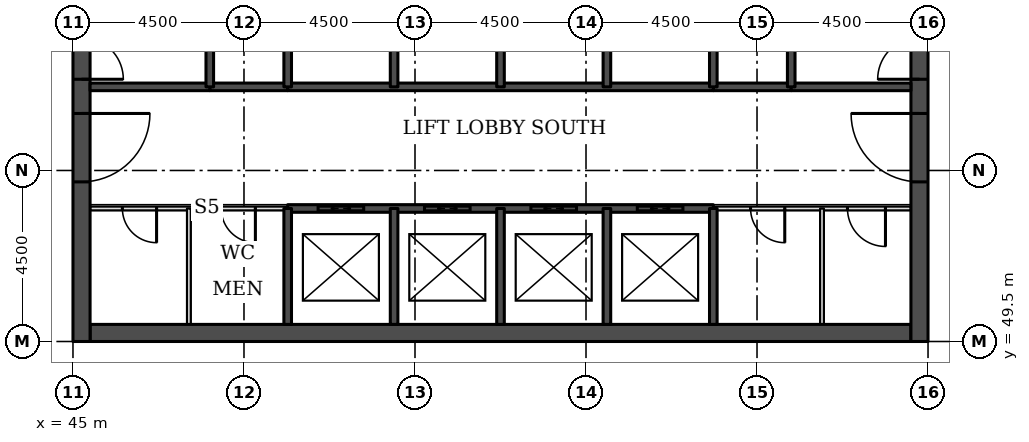
"""IFC4 building model, lengths in metres.
Left out: names, types, materials, properties, quantities, classifications, styles, units other than length and angle.
Written with IfcOpenShell. Run it as: python <this file> out.ifc"""

import sys

from ifc_helpers import new_model, si_unit, direction, frame, frame_2d, origin, place, context, subcontext, project, spatial, rectangle, extrude, element, fill, save


model = new_model("IFC4")
c1 = context("Model", 3, precision=1e-05, world=origin(), true_north=direction((0.0, 1.0)))
c2 = subcontext(c1, "Body", "Model", "MODEL_VIEW")
j1 = project(units=[si_unit("LENGTHUNIT", "METRE"), si_unit("PLANEANGLEUNIT", "RADIAN")], contexts=[c1])
p1 = place(None, origin())
s1 = spatial("IfcSite", under=j1, at=p1, CompositionType="ELEMENT")
p2 = place(p1, origin())
s2 = spatial("IfcBuilding", under=s1, at=p2, CompositionType="ELEMENT")
p3 = place(p2, frame((0.0, 0.0, 130.7)))
s3 = spatial("IfcBuildingStorey", under=s2, at=p3, CompositionType="ELEMENT", Elevation=130.7)
p4 = place(p3, frame((45.45, 49.725, 0.0), z_axis=(0.0, 0.0, 1.0), x_axis=(1.0, 0.0, 0.0)))
e1 = element("IfcWall", 1, at=p4, inside=s3, PredefinedType="SHEAR", context=c2, shape_type="SweptSolid", body=[
    extrude(rectangle(XDim=21.6, YDim=0.45, at=frame_2d((10.8, 0.0))), origin(), (0.0, 0.0, 1.0), 3.7),
])
p5 = place(p3, frame((45.225, 49.5, 0.0), z_axis=(0.0, 0.0, 1.0), x_axis=(0.0, 1.0, 0.0)))
e2 = element("IfcWall", 2, at=p5, inside=s3, PredefinedType="SHEAR", context=c2, shape_type="SweptSolid", body=[
    extrude(rectangle(XDim=22.5, YDim=0.45, at=frame_2d((11.25, 0.0))), origin(), (0.0, 0.0, 1.0), 3.7),
])
p6 = place(p5, frame((4.2, 0.0, 0.0)))
e3 = element("IfcOpeningElement", 3, at=p6, cuts=e2, PredefinedType="OPENING", context=c2, shape_type="SweptSolid", body=[
    extrude(rectangle(XDim=1.8, YDim=2.1, at=frame_2d((0.9, 1.05))), frame((0.0, 0.235, 0.0), z_axis=(0.0, -1.0, 0.0), x_axis=(1.0, 0.0, 0.0)), (0.0, 0.0, 1.0), 0.47),
])
p7 = place(p5, frame((6.9, 0.0, 0.0)))
e4 = element("IfcOpeningElement", 4, at=p7, cuts=e2, PredefinedType="OPENING", context=c2, shape_type="SweptSolid", body=[
    extrude(rectangle(XDim=1.1, YDim=2.1, at=frame_2d((0.55, 1.05))), frame((0.0, 0.235, 0.0), z_axis=(0.0, -1.0, 0.0), x_axis=(1.0, 0.0, 0.0)), (0.0, 0.0, 1.0), 0.47),
])
p8 = place(p5, frame((13.6, 0.0, 0.0)))
e5 = element("IfcOpeningElement", 5, at=p8, cuts=e2, PredefinedType="OPENING", context=c2, shape_type="SweptSolid", body=[
    extrude(rectangle(XDim=1.1, YDim=2.1, at=frame_2d((0.55, 1.05))), frame((0.0, 0.235, 0.0), z_axis=(0.0, -1.0, 0.0), x_axis=(1.0, 0.0, 0.0)), (0.0, 0.0, 1.0), 0.47),
])
p9 = place(p5, frame((16.5, 0.0, 0.0)))
e6 = element("IfcOpeningElement", 6, at=p9, cuts=e2, PredefinedType="OPENING", context=c2, shape_type="SweptSolid", body=[
    extrude(rectangle(XDim=1.8, YDim=2.1, at=frame_2d((0.9, 1.05))), frame((0.0, 0.235, 0.0), z_axis=(0.0, -1.0, 0.0), x_axis=(1.0, 0.0, 0.0)), (0.0, 0.0, 1.0), 0.47),
])
p10 = place(p3, frame((67.275, 49.5, 0.0), z_axis=(0.0, 0.0, 1.0), x_axis=(0.0, 1.0, 0.0)))
e7 = element("IfcWall", 7, at=p10, inside=s3, PredefinedType="SHEAR", context=c2, shape_type="SweptSolid", body=[
    extrude(rectangle(XDim=22.5, YDim=0.45, at=frame_2d((11.25, 0.0))), origin(), (0.0, 0.0, 1.0), 3.7),
])
p11 = place(p10, frame((4.2, 0.0, 0.0)))
e8 = element("IfcOpeningElement", 8, at=p11, cuts=e7, PredefinedType="OPENING", context=c2, shape_type="SweptSolid", body=[
    extrude(rectangle(XDim=1.8, YDim=2.1, at=frame_2d((0.9, 1.05))), frame((0.0, 0.235, 0.0), z_axis=(0.0, -1.0, 0.0), x_axis=(1.0, 0.0, 0.0)), (0.0, 0.0, 1.0), 0.47),
])
p12 = place(p10, frame((6.9, 0.0, 0.0)))
e9 = element("IfcOpeningElement", 9, at=p12, cuts=e7, PredefinedType="OPENING", context=c2, shape_type="SweptSolid", body=[
    extrude(rectangle(XDim=1.1, YDim=2.1, at=frame_2d((0.55, 1.05))), frame((0.0, 0.235, 0.0), z_axis=(0.0, -1.0, 0.0), x_axis=(1.0, 0.0, 0.0)), (0.0, 0.0, 1.0), 0.47),
])
p13 = place(p10, frame((13.6, 0.0, 0.0)))
e10 = element("IfcOpeningElement", 10, at=p13, cuts=e7, PredefinedType="OPENING", context=c2, shape_type="SweptSolid", body=[
    extrude(rectangle(XDim=1.1, YDim=2.1, at=frame_2d((0.55, 1.05))), frame((0.0, 0.235, 0.0), z_axis=(0.0, -1.0, 0.0), x_axis=(1.0, 0.0, 0.0)), (0.0, 0.0, 1.0), 0.47),
])
p14 = place(p10, frame((16.5, 0.0, 0.0)))
e11 = element("IfcOpeningElement", 11, at=p14, cuts=e7, PredefinedType="OPENING", context=c2, shape_type="SweptSolid", body=[
    extrude(rectangle(XDim=1.8, YDim=2.1, at=frame_2d((0.9, 1.05))), frame((0.0, 0.235, 0.0), z_axis=(0.0, -1.0, 0.0), x_axis=(1.0, 0.0, 0.0)), (0.0, 0.0, 1.0), 0.47),
])
p15 = place(p3, frame((45.45, 53.0, 0.0), z_axis=(0.0, 0.0, 1.0), x_axis=(1.0, 0.0, 0.0)))
e12 = element("IfcWall", 12, at=p15, inside=s3, PredefinedType="PARTITIONING", context=c2, shape_type="SweptSolid", body=[
    extrude(rectangle(XDim=5.2, YDim=0.1, at=frame_2d((2.6, 0.0))), origin(), (0.0, 0.0, 1.0), 3.55),
])
p16 = place(p15, frame((0.85, 0.0, 0.0)))
e13 = element("IfcOpeningElement", 13, at=p16, cuts=e12, PredefinedType="OPENING", context=c2, shape_type="SweptSolid", body=[
    extrude(rectangle(XDim=0.9, YDim=2.1, at=frame_2d((0.45, 1.05))), frame((0.0, 0.06, 0.0), z_axis=(0.0, -1.0, 0.0), x_axis=(1.0, 0.0, 0.0)), (0.0, 0.0, 1.0), 0.12),
])
p17 = place(p15, frame((3.45, 0.0, 0.0)))
e14 = element("IfcOpeningElement", 14, at=p17, cuts=e12, PredefinedType="OPENING", context=c2, shape_type="SweptSolid", body=[
    extrude(rectangle(XDim=0.9, YDim=2.1, at=frame_2d((0.45, 1.05))), frame((0.0, 0.06, 0.0), z_axis=(0.0, -1.0, 0.0), x_axis=(1.0, 0.0, 0.0)), (0.0, 0.0, 1.0), 0.12),
])
p18 = place(p3, frame((61.85, 53.0, 0.0), z_axis=(0.0, 0.0, 1.0), x_axis=(1.0, 0.0, 0.0)))
e15 = element("IfcWall", 15, at=p18, inside=s3, PredefinedType="PARTITIONING", context=c2, shape_type="SweptSolid", body=[
    extrude(rectangle(XDim=5.2, YDim=0.1, at=frame_2d((2.6, 0.0))), origin(), (0.0, 0.0, 1.0), 3.55),
])
p19 = place(p18, frame((3.53, 0.0, 0.0)))
e16 = element("IfcOpeningElement", 16, at=p19, cuts=e15, PredefinedType="OPENING", context=c2, shape_type="SweptSolid", body=[
    extrude(rectangle(XDim=1.0, YDim=2.1, at=frame_2d((0.5, 1.05))), frame((0.0, 0.06, 0.0), z_axis=(0.0, -1.0, 0.0), x_axis=(1.0, 0.0, 0.0)), (0.0, 0.0, 1.0), 0.12),
])
p20 = place(p18, frame((0.98, 0.0, 0.0)))
e17 = element("IfcOpeningElement", 17, at=p20, cuts=e15, PredefinedType="OPENING", context=c2, shape_type="SweptSolid", body=[
    extrude(rectangle(XDim=0.9, YDim=2.1, at=frame_2d((0.45, 1.05))), frame((0.0, 0.06, 0.0), z_axis=(0.0, -1.0, 0.0), x_axis=(1.0, 0.0, 0.0)), (0.0, 0.0, 1.0), 0.12),
])
p21 = place(p3, frame((50.65, 53.0, 0.0), z_axis=(0.0, 0.0, 1.0), x_axis=(1.0, 0.0, 0.0)))
e18 = element("IfcWall", 18, at=p21, inside=s3, PredefinedType="SOLIDWALL", context=c2, shape_type="SweptSolid", body=[
    extrude(rectangle(XDim=11.2, YDim=0.2, at=frame_2d((5.6, 0.0))), origin(), (0.0, 0.0, 1.0), 3.55),
])
p22 = place(p21, frame((0.8, 0.0, 0.0)))
e19 = element("IfcOpeningElement", 19, at=p22, cuts=e18, PredefinedType="OPENING", context=c2, shape_type="SweptSolid", body=[
    extrude(rectangle(XDim=1.2, YDim=2.1, at=frame_2d((0.6, 1.05))), frame((0.0, 0.11, 0.0), z_axis=(0.0, -1.0, 0.0), x_axis=(1.0, 0.0, 0.0)), (0.0, 0.0, 1.0), 0.22),
])
p23 = place(p21, frame((3.6, 0.0, 0.0)))
e20 = element("IfcOpeningElement", 20, at=p23, cuts=e18, PredefinedType="OPENING", context=c2, shape_type="SweptSolid", body=[
    extrude(rectangle(XDim=1.2, YDim=2.1, at=frame_2d((0.6, 1.05))), frame((0.0, 0.11, 0.0), z_axis=(0.0, -1.0, 0.0), x_axis=(1.0, 0.0, 0.0)), (0.0, 0.0, 1.0), 0.22),
])
p24 = place(p21, frame((6.4, 0.0, 0.0)))
e21 = element("IfcOpeningElement", 21, at=p24, cuts=e18, PredefinedType="OPENING", context=c2, shape_type="SweptSolid", body=[
    extrude(rectangle(XDim=1.2, YDim=2.1, at=frame_2d((0.6, 1.05))), frame((0.0, 0.11, 0.0), z_axis=(0.0, -1.0, 0.0), x_axis=(1.0, 0.0, 0.0)), (0.0, 0.0, 1.0), 0.22),
])
p25 = place(p21, frame((9.2, 0.0, 0.0)))
e22 = element("IfcOpeningElement", 22, at=p25, cuts=e18, PredefinedType="OPENING", context=c2, shape_type="SweptSolid", body=[
    extrude(rectangle(XDim=1.2, YDim=2.1, at=frame_2d((0.6, 1.05))), frame((0.0, 0.11, 0.0), z_axis=(0.0, -1.0, 0.0), x_axis=(1.0, 0.0, 0.0)), (0.0, 0.0, 1.0), 0.22),
])
for number, where, z_axis, x_axis in (
    (23, (48.6, 56.2, 0.0), (0.0, 0.0, 1.0), (1.0, 0.0, 0.0)),
    (24, (61.85, 56.2, 0.0), (0.0, 0.0, 1.0), (1.0, 0.0, 0.0)),
):
    element("IfcWall", number, at=place(p3, frame(where, z_axis=z_axis, x_axis=x_axis)), inside=s3, PredefinedType="SOLIDWALL", context=c2, shape_type="SweptSolid", body=[
        extrude(rectangle(XDim=2.05, YDim=0.2, at=frame_2d((1.025, 0.0))), origin(), (0.0, 0.0, 1.0), 3.55),
    ])
p26 = place(p3, frame((45.45, 56.2, 0.0), z_axis=(0.0, 0.0, 1.0), x_axis=(1.0, 0.0, 0.0)))
e25 = element("IfcWall", 25, at=p26, inside=s3, PredefinedType="SOLIDWALL", context=c2, shape_type="SweptSolid", body=[
    extrude(rectangle(XDim=3.15, YDim=0.2, at=frame_2d((1.575, 0.0))), origin(), (0.0, 0.0, 1.0), 3.55),
])
p27 = place(p3, frame((50.65, 56.2, 0.0), z_axis=(0.0, 0.0, 1.0), x_axis=(1.0, 0.0, 0.0)))
e26 = element("IfcWall", 26, at=p27, inside=s3, PredefinedType="SOLIDWALL", context=c2, shape_type="SweptSolid", body=[
    extrude(rectangle(XDim=11.2, YDim=0.2, at=frame_2d((5.6, 0.0))), origin(), (0.0, 0.0, 1.0), 3.55),
])
p28 = place(p3, frame((63.9, 56.2, 0.0), z_axis=(0.0, 0.0, 1.0), x_axis=(1.0, 0.0, 0.0)))
e27 = element("IfcWall", 27, at=p28, inside=s3, PredefinedType="SOLIDWALL", context=c2, shape_type="SweptSolid", body=[
    extrude(rectangle(XDim=3.15, YDim=0.2, at=frame_2d((1.575, 0.0))), origin(), (0.0, 0.0, 1.0), 3.55),
])
p29 = place(p3, frame((48.05, 49.95, 0.0), z_axis=(0.0, 0.0, 1.0), x_axis=(0.0, 1.0, 0.0)))
e28 = element("IfcWall", 28, at=p29, inside=s3, PredefinedType="PARTITIONING", context=c2, shape_type="SweptSolid", body=[
    extrude(rectangle(XDim=3.05, YDim=0.1, at=frame_2d((1.525, 0.0))), origin(), (0.0, 0.0, 1.0), 3.55),
])
p30 = place(p3, frame((48.6, 56.2, 0.0), z_axis=(0.0, 0.0, 1.0), x_axis=(0.0, 1.0, 0.0)))
e29 = element("IfcWall", 29, at=p30, inside=s3, PredefinedType="SOLIDWALL", context=c2, shape_type="SweptSolid", body=[
    extrude(rectangle(XDim=5.8, YDim=0.2, at=frame_2d((2.9, 0.0))), origin(), (0.0, 0.0, 1.0), 3.55),
])
p31 = place(p3, frame((50.65, 49.95, 0.0), z_axis=(0.0, 0.0, 1.0), x_axis=(0.0, 1.0, 0.0)))
e30 = element("IfcWall", 30, at=p31, inside=s3, PredefinedType="SOLIDWALL", context=c2, shape_type="SweptSolid", body=[
    extrude(rectangle(XDim=3.05, YDim=0.2, at=frame_2d((1.525, 0.0))), origin(), (0.0, 0.0, 1.0), 3.55),
])
p32 = place(p3, frame((50.65, 56.2, 0.0), z_axis=(0.0, 0.0, 1.0), x_axis=(0.0, 1.0, 0.0)))
e31 = element("IfcWall", 31, at=p32, inside=s3, PredefinedType="SOLIDWALL", context=c2, shape_type="SweptSolid", body=[
    extrude(rectangle(XDim=2.8, YDim=0.2, at=frame_2d((1.4, 0.0))), origin(), (0.0, 0.0, 1.0), 3.55),
])
p33 = place(p3, frame((53.45, 49.95, 0.0), z_axis=(0.0, 0.0, 1.0), x_axis=(0.0, 1.0, 0.0)))
e32 = element("IfcWall", 32, at=p33, inside=s3, PredefinedType="SOLIDWALL", context=c2, shape_type="SweptSolid", body=[
    extrude(rectangle(XDim=3.05, YDim=0.2, at=frame_2d((1.525, 0.0))), origin(), (0.0, 0.0, 1.0), 3.55),
])
p34 = place(p3, frame((53.45, 56.2, 0.0), z_axis=(0.0, 0.0, 1.0), x_axis=(0.0, 1.0, 0.0)))
e33 = element("IfcWall", 33, at=p34, inside=s3, PredefinedType="SOLIDWALL", context=c2, shape_type="SweptSolid", body=[
    extrude(rectangle(XDim=2.8, YDim=0.2, at=frame_2d((1.4, 0.0))), origin(), (0.0, 0.0, 1.0), 3.55),
])
p35 = place(p3, frame((56.25, 49.95, 0.0), z_axis=(0.0, 0.0, 1.0), x_axis=(0.0, 1.0, 0.0)))
e34 = element("IfcWall", 34, at=p35, inside=s3, PredefinedType="SOLIDWALL", context=c2, shape_type="SweptSolid", body=[
    extrude(rectangle(XDim=3.05, YDim=0.2, at=frame_2d((1.525, 0.0))), origin(), (0.0, 0.0, 1.0), 3.55),
])
p36 = place(p3, frame((56.25, 56.2, 0.0), z_axis=(0.0, 0.0, 1.0), x_axis=(0.0, 1.0, 0.0)))
e35 = element("IfcWall", 35, at=p36, inside=s3, PredefinedType="SOLIDWALL", context=c2, shape_type="SweptSolid", body=[
    extrude(rectangle(XDim=2.8, YDim=0.2, at=frame_2d((1.4, 0.0))), origin(), (0.0, 0.0, 1.0), 3.55),
])
p37 = place(p3, frame((59.05, 49.95, 0.0), z_axis=(0.0, 0.0, 1.0), x_axis=(0.0, 1.0, 0.0)))
e36 = element("IfcWall", 36, at=p37, inside=s3, PredefinedType="SOLIDWALL", context=c2, shape_type="SweptSolid", body=[
    extrude(rectangle(XDim=3.05, YDim=0.2, at=frame_2d((1.525, 0.0))), origin(), (0.0, 0.0, 1.0), 3.55),
])
p38 = place(p3, frame((59.05, 56.2, 0.0), z_axis=(0.0, 0.0, 1.0), x_axis=(0.0, 1.0, 0.0)))
e37 = element("IfcWall", 37, at=p38, inside=s3, PredefinedType="SOLIDWALL", context=c2, shape_type="SweptSolid", body=[
    extrude(rectangle(XDim=2.8, YDim=0.2, at=frame_2d((1.4, 0.0))), origin(), (0.0, 0.0, 1.0), 3.55),
])
p39 = place(p3, frame((61.85, 49.95, 0.0), z_axis=(0.0, 0.0, 1.0), x_axis=(0.0, 1.0, 0.0)))
e38 = element("IfcWall", 38, at=p39, inside=s3, PredefinedType="SOLIDWALL", context=c2, shape_type="SweptSolid", body=[
    extrude(rectangle(XDim=3.05, YDim=0.2, at=frame_2d((1.525, 0.0))), origin(), (0.0, 0.0, 1.0), 3.55),
])
p40 = place(p3, frame((61.85, 56.2, 0.0), z_axis=(0.0, 0.0, 1.0), x_axis=(0.0, 1.0, 0.0)))
e39 = element("IfcWall", 39, at=p40, inside=s3, PredefinedType="SOLIDWALL", context=c2, shape_type="SweptSolid", body=[
    extrude(rectangle(XDim=2.8, YDim=0.2, at=frame_2d((1.4, 0.0))), origin(), (0.0, 0.0, 1.0), 3.55),
])
p41 = place(p3, frame((63.9, 56.2, 0.0), z_axis=(0.0, 0.0, 1.0), x_axis=(0.0, 1.0, 0.0)))
e40 = element("IfcWall", 40, at=p41, inside=s3, PredefinedType="SOLIDWALL", context=c2, shape_type="SweptSolid", body=[
    extrude(rectangle(XDim=5.8, YDim=0.2, at=frame_2d((2.9, 0.0))), origin(), (0.0, 0.0, 1.0), 3.55),
])
p42 = place(p3, frame((64.71, 49.95, 0.0), z_axis=(0.0, 0.0, 1.0), x_axis=(0.0, 1.0, 0.0)))
e41 = element("IfcWall", 41, at=p42, inside=s3, PredefinedType="PARTITIONING", context=c2, shape_type="SweptSolid", body=[
    extrude(rectangle(XDim=3.05, YDim=0.1, at=frame_2d((1.525, 0.0))), origin(), (0.0, 0.0, 1.0), 3.55),
])
p43 = place(p22, origin())
e42 = element("IfcDoor", 42, at=p43, inside=s3, OperationType="DOUBLE_DOOR_SLIDING", PredefinedType="DOOR", context=c2, shape_type="SweptSolid", body=[
    extrude(rectangle(XDim=1.2, YDim=2.1, at=frame_2d((0.6, 1.05))), frame((0.0, 0.025, 0.0), z_axis=(0.0, -1.0, 0.0), x_axis=(1.0, 0.0, 0.0)), (0.0, 0.0, 1.0), 0.05),
])
fill(e19, e42)
p44 = place(p23, origin())
e43 = element("IfcDoor", 43, at=p44, inside=s3, OperationType="DOUBLE_DOOR_SLIDING", PredefinedType="DOOR", context=c2, shape_type="SweptSolid", body=[
    extrude(rectangle(XDim=1.2, YDim=2.1, at=frame_2d((0.6, 1.05))), frame((0.0, 0.025, 0.0), z_axis=(0.0, -1.0, 0.0), x_axis=(1.0, 0.0, 0.0)), (0.0, 0.0, 1.0), 0.05),
])
fill(e20, e43)
p45 = place(p24, origin())
e44 = element("IfcDoor", 44, at=p45, inside=s3, OperationType="DOUBLE_DOOR_SLIDING", PredefinedType="DOOR", context=c2, shape_type="SweptSolid", body=[
    extrude(rectangle(XDim=1.2, YDim=2.1, at=frame_2d((0.6, 1.05))), frame((0.0, 0.025, 0.0), z_axis=(0.0, -1.0, 0.0), x_axis=(1.0, 0.0, 0.0)), (0.0, 0.0, 1.0), 0.05),
])
fill(e21, e44)
p46 = place(p25, origin())
e45 = element("IfcDoor", 45, at=p46, inside=s3, OperationType="DOUBLE_DOOR_SLIDING", PredefinedType="DOOR", context=c2, shape_type="SweptSolid", body=[
    extrude(rectangle(XDim=1.2, YDim=2.1, at=frame_2d((0.6, 1.05))), frame((0.0, 0.025, 0.0), z_axis=(0.0, -1.0, 0.0), x_axis=(1.0, 0.0, 0.0)), (0.0, 0.0, 1.0), 0.05),
])
fill(e22, e45)
p47 = place(p6, frame((1.8, 0.0, 0.0), z_axis=(0.0, 0.0, 1.0), x_axis=(-1.0, 0.0, 0.0)))
e46 = element("IfcDoor", 46, at=p47, inside=s3, OperationType="SINGLE_SWING_LEFT", PredefinedType="DOOR", context=c2, shape_type="SweptSolid", body=[
    extrude(rectangle(XDim=1.8, YDim=2.1, at=frame_2d((0.9, 1.05))), frame((0.0, 0.025, 0.0), z_axis=(0.0, -1.0, 0.0), x_axis=(1.0, 0.0, 0.0)), (0.0, 0.0, 1.0), 0.05),
])
fill(e3, e46)
p48 = place(p7, frame((1.1, 0.0, 0.0), z_axis=(0.0, 0.0, 1.0), x_axis=(-1.0, 0.0, 0.0)))
e47 = element("IfcDoor", 47, at=p48, inside=s3, OperationType="SINGLE_SWING_RIGHT", PredefinedType="DOOR", context=c2, shape_type="SweptSolid", body=[
    extrude(rectangle(XDim=1.1, YDim=2.1, at=frame_2d((0.55, 1.05))), frame((0.0, 0.025, 0.0), z_axis=(0.0, -1.0, 0.0), x_axis=(1.0, 0.0, 0.0)), (0.0, 0.0, 1.0), 0.05),
])
fill(e4, e47)
p49 = place(p11, origin())
e48 = element("IfcDoor", 48, at=p49, inside=s3, OperationType="SINGLE_SWING_RIGHT", PredefinedType="DOOR", context=c2, shape_type="SweptSolid", body=[
    extrude(rectangle(XDim=1.8, YDim=2.1, at=frame_2d((0.9, 1.05))), frame((0.0, 0.025, 0.0), z_axis=(0.0, -1.0, 0.0), x_axis=(1.0, 0.0, 0.0)), (0.0, 0.0, 1.0), 0.05),
])
fill(e8, e48)
p50 = place(p12, origin())
e49 = element("IfcDoor", 49, at=p50, inside=s3, OperationType="SINGLE_SWING_LEFT", PredefinedType="DOOR", context=c2, shape_type="SweptSolid", body=[
    extrude(rectangle(XDim=1.1, YDim=2.1, at=frame_2d((0.55, 1.05))), frame((0.0, 0.025, 0.0), z_axis=(0.0, -1.0, 0.0), x_axis=(1.0, 0.0, 0.0)), (0.0, 0.0, 1.0), 0.05),
])
fill(e9, e49)
p51 = place(p19, frame((1.0, 0.0, 0.0), z_axis=(0.0, 0.0, 1.0), x_axis=(-1.0, 0.0, 0.0)))
e50 = element("IfcDoor", 50, at=p51, inside=s3, OperationType="SINGLE_SWING_LEFT", PredefinedType="DOOR", context=c2, shape_type="SweptSolid", body=[
    extrude(rectangle(XDim=1.0, YDim=2.1, at=frame_2d((0.5, 1.05))), frame((0.0, 0.025, 0.0), z_axis=(0.0, -1.0, 0.0), x_axis=(1.0, 0.0, 0.0)), (0.0, 0.0, 1.0), 0.05),
])
fill(e16, e50)
p52 = place(p20, frame((0.9, 0.0, 0.0), z_axis=(0.0, 0.0, 1.0), x_axis=(-1.0, 0.0, 0.0)))
e51 = element("IfcDoor", 51, at=p52, inside=s3, OperationType="SINGLE_SWING_LEFT", PredefinedType="DOOR", context=c2, shape_type="SweptSolid", body=[
    extrude(rectangle(XDim=0.9, YDim=2.1, at=frame_2d((0.45, 1.05))), frame((0.0, 0.025, 0.0), z_axis=(0.0, -1.0, 0.0), x_axis=(1.0, 0.0, 0.0)), (0.0, 0.0, 1.0), 0.05),
])
fill(e17, e51)
p53 = place(p16, frame((0.9, 0.0, 0.0), z_axis=(0.0, 0.0, 1.0), x_axis=(-1.0, 0.0, 0.0)))
e52 = element("IfcDoor", 52, at=p53, inside=s3, OperationType="SINGLE_SWING_LEFT", PredefinedType="DOOR", context=c2, shape_type="SweptSolid", body=[
    extrude(rectangle(XDim=0.9, YDim=2.1, at=frame_2d((0.45, 1.05))), frame((0.0, 0.025, 0.0), z_axis=(0.0, -1.0, 0.0), x_axis=(1.0, 0.0, 0.0)), (0.0, 0.0, 1.0), 0.05),
])
fill(e13, e52)
p54 = place(p17, frame((0.9, 0.0, 0.0), z_axis=(0.0, 0.0, 1.0), x_axis=(-1.0, 0.0, 0.0)))
e53 = element("IfcDoor", 53, at=p54, inside=s3, OperationType="SINGLE_SWING_LEFT", PredefinedType="DOOR", context=c2, shape_type="SweptSolid", body=[
    extrude(rectangle(XDim=0.9, YDim=2.1, at=frame_2d((0.45, 1.05))), frame((0.0, 0.025, 0.0), z_axis=(0.0, -1.0, 0.0), x_axis=(1.0, 0.0, 0.0)), (0.0, 0.0, 1.0), 0.05),
])
fill(e14, e53)
save(model, sys.argv[1])
